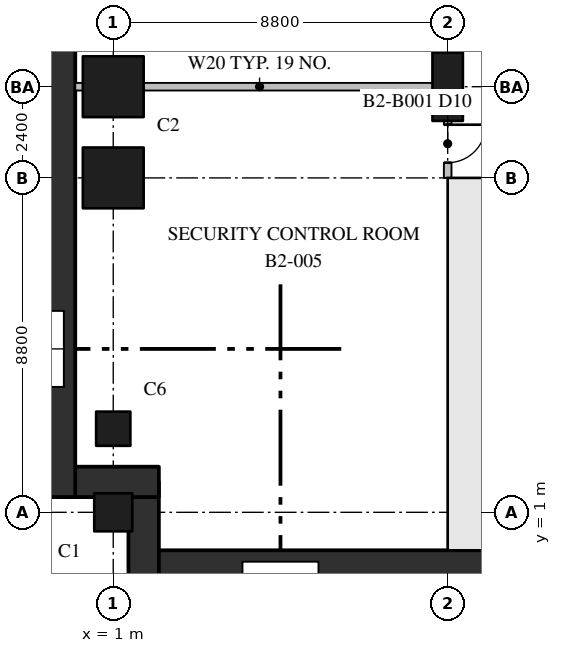
"""IFC4 building model, lengths in metres.
Left out: names, types, materials, properties, quantities, classifications, styles, units other than length and angle.
Written with IfcOpenShell. Run it as: python <this file> out.ifc"""

import sys

from ifc_helpers import new_model, si_unit, direction, frame, frame_2d, origin, origin_2d, place, context, subcontext, project, spatial, rectangle, extrude, element, fill, save


model = new_model("IFC4")
c1 = context("Model", 3, precision=1e-05, world=origin(), true_north=direction((0.0, 1.0)))
c2 = subcontext(c1, "Body", "Model", "MODEL_VIEW")
j1 = project(units=[si_unit("LENGTHUNIT", "METRE"), si_unit("PLANEANGLEUNIT", "RADIAN")], contexts=[c1])
p1 = place(None, origin())
s1 = spatial("IfcSite", under=j1, at=p1, CompositionType="ELEMENT")
p2 = place(p1, origin())
s2 = spatial("IfcBuilding", under=s1, at=p2, CompositionType="ELEMENT")
p3 = place(p2, frame((0.0, 0.0, -12.0)))
s3 = spatial("IfcBuildingStorey", under=s2, at=p3, CompositionType="ELEMENT", Elevation=-12.0)
p4 = place(p3, frame((1.0, 1.0, 0.0), z_axis=(0.0, 0.0, 1.0), x_axis=(1.0, 0.0, 0.0)))
e1 = element("IfcColumn", 1, at=p4, inside=s3, PredefinedType="COLUMN", context=c2, shape_type="SweptSolid", body=[
    extrude(rectangle(XDim=1.0, YDim=1.0, at=origin_2d()), origin(), (0.0, 0.0, 1.0), 5.0),
])
for number, where, z_axis, x_axis in (
    (2, (1.0, 9.8, 0.0), (0.0, 0.0, 1.0), (1.0, 0.0, 0.0)),
    (3, (1.0, 12.2, 0.0), (0.0, 0.0, 1.0), (1.0, 0.0, 0.0)),
):
    element("IfcColumn", number, at=place(p3, frame(where, z_axis=z_axis, x_axis=x_axis)), inside=s3, PredefinedType="COLUMN", context=c2, shape_type="SweptSolid", body=[
        extrude(rectangle(XDim=1.6, YDim=1.6, at=origin_2d()), origin(), (0.0, 0.0, 1.0), 5.0),
    ])
p5 = place(p3, frame((9.8, 12.2, 0.0), z_axis=(0.0, 0.0, 1.0), x_axis=(0.0, 1.0, 0.0)))
e4 = element("IfcColumn", 4, at=p5, inside=s3, PredefinedType="COLUMN", context=c2, shape_type="SweptSolid", body=[
    extrude(rectangle(XDim=1.8, YDim=0.8, at=origin_2d()), origin(), (0.0, 0.0, 1.0), 5.0),
])
p6 = place(p3, frame((1.0, 3.2, 0.0), z_axis=(0.0, 0.0, 1.0), x_axis=(1.0, 0.0, 0.0)))
e5 = element("IfcColumn", 5, at=p6, inside=s3, PredefinedType="COLUMN", context=c2, shape_type="SweptSolid", body=[
    extrude(rectangle(XDim=0.9, YDim=0.9, at=origin_2d()), origin(), (0.0, 0.0, 1.0), 5.0),
])
p7 = place(p3, frame((9.8, 0.6, 0.0), z_axis=(0.0, 0.0, 1.0), x_axis=(1.0, 0.0, 0.0)))
e6 = element("IfcWall", 6, at=p7, inside=s3, PredefinedType="SHEAR", context=c2, shape_type="SweptSolid", body=[
    extrude(rectangle(XDim=35.2, YDim=1.2, at=frame_2d((17.6, 0.0))), origin(), (0.0, 0.0, 1.0), 5.0),
])
p8 = place(p3, frame((10.4, 1.2, 0.0), z_axis=(0.0, 0.0, 1.0), x_axis=(0.0, 1.0, 0.0)))
e7 = element("IfcWall", 7, at=p8, inside=s3, PredefinedType="SHEAR", context=c2, shape_type="SweptSolid", body=[
    extrude(rectangle(XDim=8.6, YDim=1.2, at=frame_2d((4.3, 0.0))), origin(), (0.0, 0.0, 1.0), 5.0),
])
p9 = place(p3, frame((9.8, 9.6, 0.0), z_axis=(0.0, 0.0, 1.0), x_axis=(1.0, 0.0, 0.0)))
e8 = element("IfcWall", 8, at=p9, inside=s3, PredefinedType="SHEAR", context=c2, shape_type="SweptSolid", body=[
    extrude(rectangle(XDim=4.3, YDim=0.4, at=frame_2d((2.15, 0.0))), origin(), (0.0, 0.0, 1.0), 5.0),
])
p10 = place(p9, frame((2.05, 0.0, 0.0)))
e9 = element("IfcOpeningElement", 9, at=p10, cuts=e8, PredefinedType="OPENING", context=c2, shape_type="SweptSolid", body=[
    extrude(rectangle(XDim=1.2, YDim=2.1, at=frame_2d((0.6, 1.05))), frame((0.0, 0.21, 0.0), z_axis=(0.0, -1.0, 0.0), x_axis=(1.0, 0.0, 0.0)), (0.0, 0.0, 1.0), 0.42),
])
p11 = place(p3, frame((79.8, -0.4, 0.0), z_axis=(0.0, 0.0, 1.0), x_axis=(-1.0, 0.0, 0.0)))
e10 = element("IfcWall", 10, at=p11, inside=s3, PredefinedType="SHEAR", context=c2, shape_type="SweptSolid", body=[
    extrude(rectangle(XDim=78.0, YDim=0.8, at=frame_2d((39.0, 0.0))), origin(), (0.0, 0.0, 1.0), 5.0),
])
p12 = place(p3, frame((1.8, -0.8, 0.0), z_axis=(0.0, 0.0, 1.0), x_axis=(0.0, 1.0, 0.0)))
e11 = element("IfcWall", 11, at=p12, inside=s3, PredefinedType="SHEAR", context=c2, shape_type="SweptSolid", body=[
    extrude(rectangle(XDim=2.6, YDim=0.8, at=frame_2d((1.3, 0.0))), origin(), (0.0, 0.0, 1.0), 5.0),
])
p13 = place(p3, frame((2.2, 1.8, 0.0), z_axis=(0.0, 0.0, 1.0), x_axis=(-1.0, 0.0, 0.0)))
e12 = element("IfcWall", 12, at=p13, inside=s3, PredefinedType="SHEAR", context=c2, shape_type="SweptSolid", body=[
    extrude(rectangle(XDim=2.6, YDim=0.8, at=frame_2d((1.3, 0.0))), origin(), (0.0, 0.0, 1.0), 5.0),
])
p14 = place(p3, frame((-0.4, 1.4, 0.0), z_axis=(0.0, 0.0, 1.0), x_axis=(0.0, 1.0, 0.0)))
e13 = element("IfcWall", 13, at=p14, inside=s3, PredefinedType="SHEAR", context=c2, shape_type="SweptSolid", body=[
    extrude(rectangle(XDim=78.0, YDim=0.8, at=frame_2d((39.0, 0.0))), origin(), (0.0, 0.0, 1.0), 5.0),
])
p15 = place(p3, frame((0.0, 12.2, 0.0), z_axis=(0.0, 0.0, 1.0), x_axis=(1.0, 0.0, 0.0)))
e14 = element("IfcWall", 14, at=p15, inside=s3, PredefinedType="PARTITIONING", context=c2, shape_type="SweptSolid", body=[
    extrude(rectangle(XDim=9.7, YDim=0.2, at=frame_2d((4.85, 0.0))), origin(), (0.0, 0.0, 1.0), 4.598),
])
p16 = place(p3, frame((9.8, 9.8, 0.0), z_axis=(0.0, 0.0, 1.0), x_axis=(0.0, 1.0, 0.0)))
e15 = element("IfcWall", 15, at=p16, inside=s3, PredefinedType="PARTITIONING", context=c2, shape_type="SweptSolid", body=[
    extrude(rectangle(XDim=48.0, YDim=0.2, at=frame_2d((24.0, 0.0))), origin(), (0.0, 0.0, 1.0), 4.598),
])
p17 = place(p16, frame((0.4, 0.0, 0.0)))
e16 = element("IfcOpeningElement", 16, at=p17, cuts=e15, PredefinedType="OPENING", context=c2, shape_type="SweptSolid", body=[
    extrude(rectangle(XDim=1.0, YDim=2.1, at=frame_2d((0.5, 1.05))), frame((0.0, 0.11, 0.0), z_axis=(0.0, -1.0, 0.0), x_axis=(1.0, 0.0, 0.0)), (0.0, 0.0, 1.0), 0.22),
])
p18 = place(p16, frame((5.9, 0.0, 0.0)))
e17 = element("IfcOpeningElement", 17, at=p18, cuts=e15, PredefinedType="OPENING", context=c2, shape_type="SweptSolid", body=[
    extrude(rectangle(XDim=1.0, YDim=2.1, at=frame_2d((0.5, 1.05))), frame((0.0, 0.11, 0.0), z_axis=(0.0, -1.0, 0.0), x_axis=(1.0, 0.0, 0.0)), (0.0, 0.0, 1.0), 0.22),
])
p19 = place(p16, frame((14.2, 0.0, 0.0)))
e18 = element("IfcOpeningElement", 18, at=p19, cuts=e15, PredefinedType="OPENING", context=c2, shape_type="SweptSolid", body=[
    extrude(rectangle(XDim=1.0, YDim=2.1, at=frame_2d((0.5, 1.05))), frame((0.0, 0.11, 0.0), z_axis=(0.0, -1.0, 0.0), x_axis=(1.0, 0.0, 0.0)), (0.0, 0.0, 1.0), 0.22),
])
p20 = place(p16, frame((21.7, 0.0, 0.0)))
e19 = element("IfcOpeningElement", 19, at=p20, cuts=e15, PredefinedType="OPENING", context=c2, shape_type="SweptSolid", body=[
    extrude(rectangle(XDim=1.0, YDim=2.1, at=frame_2d((0.5, 1.05))), frame((0.0, 0.11, 0.0), z_axis=(0.0, -1.0, 0.0), x_axis=(1.0, 0.0, 0.0)), (0.0, 0.0, 1.0), 0.22),
])
p21 = place(p16, frame((30.2, 0.0, 0.0)))
e20 = element("IfcOpeningElement", 20, at=p21, cuts=e15, PredefinedType="OPENING", context=c2, shape_type="SweptSolid", body=[
    extrude(rectangle(XDim=1.0, YDim=2.1, at=frame_2d((0.5, 1.05))), frame((0.0, 0.11, 0.0), z_axis=(0.0, -1.0, 0.0), x_axis=(1.0, 0.0, 0.0)), (0.0, 0.0, 1.0), 0.22),
])
p22 = place(p16, frame((38.8, 0.0, 0.0)))
e21 = element("IfcOpeningElement", 21, at=p22, cuts=e15, PredefinedType="OPENING", context=c2, shape_type="SweptSolid", body=[
    extrude(rectangle(XDim=1.0, YDim=2.1, at=frame_2d((0.5, 1.05))), frame((0.0, 0.11, 0.0), z_axis=(0.0, -1.0, 0.0), x_axis=(1.0, 0.0, 0.0)), (0.0, 0.0, 1.0), 0.22),
])
p23 = place(p16, frame((45.0, 0.0, 0.0)))
e22 = element("IfcOpeningElement", 22, at=p23, cuts=e15, PredefinedType="OPENING", context=c2, shape_type="SweptSolid", body=[
    extrude(rectangle(XDim=1.0, YDim=2.1, at=frame_2d((0.5, 1.05))), frame((0.0, 0.11, 0.0), z_axis=(0.0, -1.0, 0.0), x_axis=(1.0, 0.0, 0.0)), (0.0, 0.0, 1.0), 0.22),
])
p24 = place(p17, frame((1.0, 0.0, 0.0), z_axis=(0.0, 0.0, 1.0), x_axis=(-1.0, 0.0, 0.0)))
e23 = element("IfcDoor", 23, at=p24, inside=s3, OperationType="SINGLE_SWING_RIGHT", PredefinedType="DOOR", context=c2, shape_type="SweptSolid", body=[
    extrude(rectangle(XDim=1.0, YDim=2.1, at=frame_2d((0.5, 1.05))), frame((0.0, 0.025, 0.0), z_axis=(0.0, -1.0, 0.0), x_axis=(1.0, 0.0, 0.0)), (0.0, 0.0, 1.0), 0.05),
])
fill(e16, e23)
save(model, sys.argv[1])
